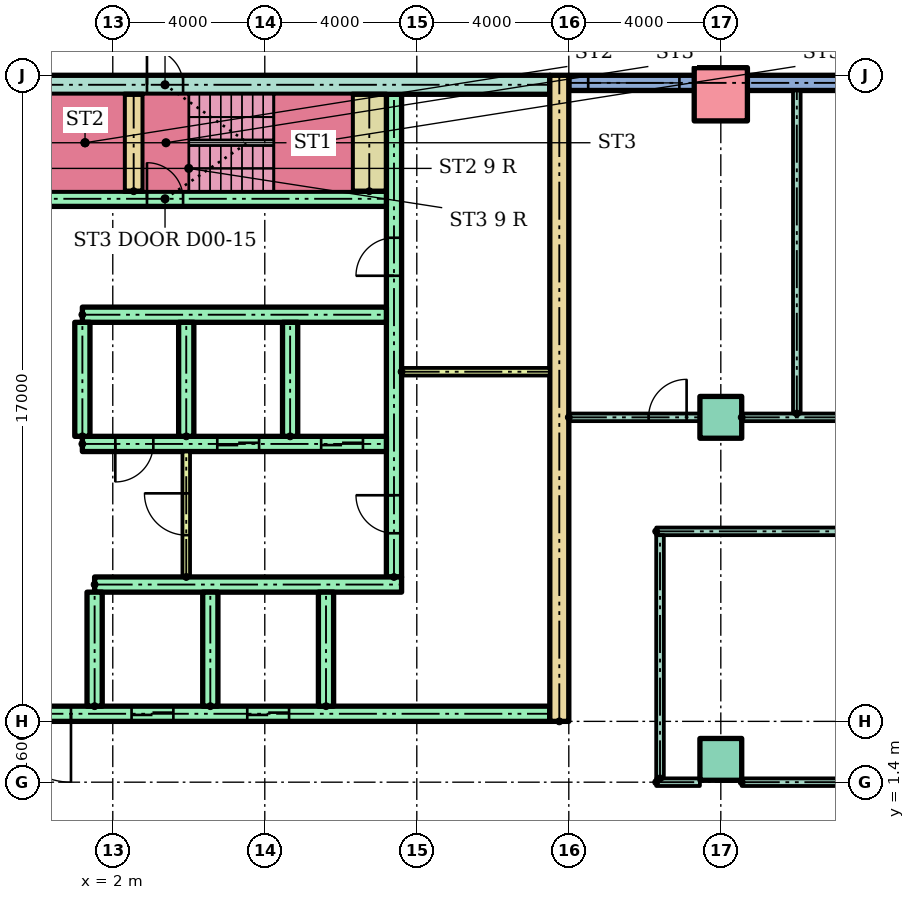
"""IFC4 building model, lengths in metres.
Left out: names, types, materials, properties, quantities, classifications, styles, units other than length and angle.
Written with IfcOpenShell. Run it as: python <this file> out.ifc"""

import sys

from ifc_helpers import new_model, si_unit, direction, frame, frame_2d, origin, origin_2d, place, context, subcontext, project, spatial, rectangle, hollow_rectangle, extrude, element, fill, save


model = new_model("IFC4")
c1 = context("Model", 3, precision=1e-05, world=origin(), true_north=direction((0.0, 1.0)))
c2 = subcontext(c1, "Body", "Model", "MODEL_VIEW")
j1 = project(units=[si_unit("LENGTHUNIT", "METRE"), si_unit("PLANEANGLEUNIT", "RADIAN")], contexts=[c1])
p1 = place(None, origin())
s1 = spatial("IfcSite", under=j1, at=p1, CompositionType="ELEMENT")
p2 = place(p1, origin())
s2 = spatial("IfcBuilding", under=s1, at=p2, CompositionType="ELEMENT")
p3 = place(p2, origin())
s3 = spatial("IfcBuildingStorey", under=s2, at=p3, CompositionType="ELEMENT", Elevation=0.0)
for number, where in (
    (1, (18.0, 2.0, 0.0)),
    (2, (18.0, 11.0, 0.0)),
):
    element("IfcColumn", number, at=place(p3, frame(where)), inside=s3, PredefinedType="COLUMN", context=c2, shape_type="SweptSolid", body=[
        extrude(rectangle(XDim=1.1, YDim=1.1, at=origin_2d()), origin(), (0.0, 0.0, 1.0), 6.0),
    ])
p4 = place(p3, frame((18.0, 19.5, 0.0)))
e3 = element("IfcColumn", 3, at=p4, inside=s3, PredefinedType="COLUMN", context=c2, shape_type="SweptSolid", body=[
    extrude(hollow_rectangle(XDim=1.4, YDim=1.4, WallThickness=0.08, at=origin_2d()), origin(), (0.0, 0.0, 1.0), 6.0),
])
p5 = place(p3, frame((39.6, 19.8, 0.0), z_axis=(0.0, 0.0, 1.0), x_axis=(-1.0, 0.0, 0.0)))
e4 = element("IfcWall", 4, at=p5, inside=s3, PredefinedType="STANDARD", context=c2, shape_type="SweptSolid", body=[
    extrude(rectangle(XDim=25.6, YDim=0.4, at=frame_2d((12.8, 0.0))), origin(), (0.0, 0.0, 1.0), 5.7),
])
p6 = place(p5, frame((2.7, 0.0, 0.0)))
e5 = element("IfcOpeningElement", 5, at=p6, cuts=e4, PredefinedType="OPENING", context=c2, shape_type="SweptSolid", body=[
    extrude(rectangle(XDim=1.8, YDim=2.4, at=frame_2d((0.9, 1.2))), frame((0.0, 0.21, 0.0), z_axis=(0.0, -1.0, 0.0), x_axis=(1.0, 0.0, 0.0)), (0.0, 0.0, 1.0), 0.42),
])
p7 = place(p5, frame((22.69, 0.0, 0.9)))
e6 = element("IfcOpeningElement", 6, at=p7, cuts=e4, PredefinedType="OPENING", context=c2, shape_type="SweptSolid", body=[
    extrude(rectangle(XDim=2.4, YDim=2.4, at=frame_2d((1.2, 1.2))), frame((0.0, 0.21, 0.0), z_axis=(0.0, -1.0, 0.0), x_axis=(1.0, 0.0, 0.0)), (0.0, 0.0, 1.0), 0.42),
])
p8 = place(p5, frame((7.85, 0.0, 0.0)))
e7 = element("IfcOpeningElement", 7, at=p8, cuts=e4, PredefinedType="OPENING", context=c2, shape_type="SweptSolid", body=[
    extrude(rectangle(XDim=3.5, YDim=4.5, at=frame_2d((1.75, 2.25))), frame((0.0, 0.21, 0.0), z_axis=(0.0, -1.0, 0.0), x_axis=(1.0, 0.0, 0.0)), (0.0, 0.0, 1.0), 0.42),
])
p9 = place(p3, frame((13.75, 3.0, 0.0), z_axis=(0.0, 0.0, 1.0), x_axis=(0.0, 1.0, 0.0)))
e8 = element("IfcWall", 8, at=p9, inside=s3, PredefinedType="SHEAR", context=c2, shape_type="SweptSolid", body=[
    extrude(rectangle(XDim=17.0, YDim=0.5, at=frame_2d((8.5, 0.0))), origin(), (0.0, 0.0, 1.0), 5.7),
])
p10 = place(p3, frame((-13.5, 19.75, 0.0)))
e9 = element("IfcWall", 9, at=p10, inside=s3, PredefinedType="SHEAR", context=c2, shape_type="SweptSolid", body=[
    extrude(rectangle(XDim=27.0, YDim=0.5, at=frame_2d((13.5, 0.0))), origin(), (0.0, 0.0, 1.0), 5.7),
])
p11 = place(p10, frame((4.4, 0.0, 0.0)))
e10 = element("IfcOpeningElement", 10, at=p11, cuts=e9, PredefinedType="OPENING", context=c2, shape_type="SweptSolid", body=[
    extrude(rectangle(XDim=0.95, YDim=2.1, at=frame_2d((0.475, 1.05))), frame((0.0, 0.26, 0.0), z_axis=(0.0, -1.0, 0.0), x_axis=(1.0, 0.0, 0.0)), (0.0, 0.0, 1.0), 0.52),
])
p12 = place(p10, frame((10.4, 0.0, 0.0)))
e11 = element("IfcOpeningElement", 11, at=p12, cuts=e9, PredefinedType="OPENING", context=c2, shape_type="SweptSolid", body=[
    extrude(rectangle(XDim=0.95, YDim=2.1, at=frame_2d((0.475, 1.05))), frame((0.0, 0.26, 0.0), z_axis=(0.0, -1.0, 0.0), x_axis=(1.0, 0.0, 0.0)), (0.0, 0.0, 1.0), 0.52),
])
p13 = place(p10, frame((16.4, 0.0, 0.0)))
e12 = element("IfcOpeningElement", 12, at=p13, cuts=e9, PredefinedType="OPENING", context=c2, shape_type="SweptSolid", body=[
    extrude(rectangle(XDim=0.95, YDim=2.1, at=frame_2d((0.475, 1.05))), frame((0.0, 0.26, 0.0), z_axis=(0.0, -1.0, 0.0), x_axis=(1.0, 0.0, 0.0)), (0.0, 0.0, 1.0), 0.52),
])
p14 = place(p3, frame((9.4, 6.8, 0.0), z_axis=(0.0, 0.0, 1.0), x_axis=(0.0, 1.0, 0.0)))
e13 = element("IfcWall", 13, at=p14, inside=s3, PredefinedType="SHEAR", context=c2, shape_type="SweptSolid", body=[
    extrude(rectangle(XDim=12.7, YDim=0.4, at=frame_2d((6.35, 0.0))), origin(), (0.0, 0.0, 1.0), 5.7),
])
p15 = place(p14, frame((1.15, 0.0, 0.0)))
e14 = element("IfcOpeningElement", 14, at=p15, cuts=e13, PredefinedType="OPENING", context=c2, shape_type="SweptSolid", body=[
    extrude(rectangle(XDim=1.0, YDim=2.1, at=frame_2d((0.5, 1.05))), frame((0.0, 0.21, 0.0), z_axis=(0.0, -1.0, 0.0), x_axis=(1.0, 0.0, 0.0)), (0.0, 0.0, 1.0), 0.42),
])
p16 = place(p14, frame((7.925, 0.0, 0.0)))
e15 = element("IfcOpeningElement", 15, at=p16, cuts=e13, PredefinedType="OPENING", context=c2, shape_type="SweptSolid", body=[
    extrude(rectangle(XDim=1.0, YDim=2.1, at=frame_2d((0.5, 1.05))), frame((0.0, 0.21, 0.0), z_axis=(0.0, -1.0, 0.0), x_axis=(1.0, 0.0, 0.0)), (0.0, 0.0, 1.0), 0.42),
])
p17 = place(p3, frame((-13.5, 3.2, 0.0)))
e16 = element("IfcWall", 16, at=p17, inside=s3, PredefinedType="SHEAR", context=c2, shape_type="SweptSolid", body=[
    extrude(rectangle(XDim=27.0, YDim=0.4, at=frame_2d((13.5, 0.0))), origin(), (0.0, 0.0, 1.0), 5.7),
])
p18 = place(p17, frame((0.772, 0.0, 0.0)))
e17 = element("IfcOpeningElement", 17, at=p18, cuts=e16, PredefinedType="OPENING", context=c2, shape_type="SweptSolid", body=[
    extrude(rectangle(XDim=1.1, YDim=2.1, at=frame_2d((0.55, 1.05))), frame((0.0, 0.21, 0.0), z_axis=(0.0, -1.0, 0.0), x_axis=(1.0, 0.0, 0.0)), (0.0, 0.0, 1.0), 0.42),
])
p19 = place(p17, frame((3.817, 0.0, 0.0)))
e18 = element("IfcOpeningElement", 18, at=p19, cuts=e16, PredefinedType="OPENING", context=c2, shape_type="SweptSolid", body=[
    extrude(rectangle(XDim=1.1, YDim=2.1, at=frame_2d((0.55, 1.05))), frame((0.0, 0.21, 0.0), z_axis=(0.0, -1.0, 0.0), x_axis=(1.0, 0.0, 0.0)), (0.0, 0.0, 1.0), 0.42),
])
p20 = place(p17, frame((6.861, 0.0, 0.0)))
e19 = element("IfcOpeningElement", 19, at=p20, cuts=e16, PredefinedType="OPENING", context=c2, shape_type="SweptSolid", body=[
    extrude(rectangle(XDim=1.1, YDim=2.1, at=frame_2d((0.55, 1.05))), frame((0.0, 0.21, 0.0), z_axis=(0.0, -1.0, 0.0), x_axis=(1.0, 0.0, 0.0)), (0.0, 0.0, 1.0), 0.42),
])
p21 = place(p17, frame((9.906, 0.0, 0.0)))
e20 = element("IfcOpeningElement", 20, at=p21, cuts=e16, PredefinedType="OPENING", context=c2, shape_type="SweptSolid", body=[
    extrude(rectangle(XDim=1.1, YDim=2.1, at=frame_2d((0.55, 1.05))), frame((0.0, 0.21, 0.0), z_axis=(0.0, -1.0, 0.0), x_axis=(1.0, 0.0, 0.0)), (0.0, 0.0, 1.0), 0.42),
])
p22 = place(p17, frame((15.994, 0.0, 0.0)))
e21 = element("IfcOpeningElement", 21, at=p22, cuts=e16, PredefinedType="OPENING", context=c2, shape_type="SweptSolid", body=[
    extrude(rectangle(XDim=1.1, YDim=2.1, at=frame_2d((0.55, 1.05))), frame((0.0, 0.21, 0.0), z_axis=(0.0, -1.0, 0.0), x_axis=(1.0, 0.0, 0.0)), (0.0, 0.0, 1.0), 0.42),
])
p23 = place(p17, frame((19.039, 0.0, 0.0)))
e22 = element("IfcOpeningElement", 22, at=p23, cuts=e16, PredefinedType="OPENING", context=c2, shape_type="SweptSolid", body=[
    extrude(rectangle(XDim=1.1, YDim=2.1, at=frame_2d((0.55, 1.05))), frame((0.0, 0.21, 0.0), z_axis=(0.0, -1.0, 0.0), x_axis=(1.0, 0.0, 0.0)), (0.0, 0.0, 1.0), 0.42),
])
p24 = place(p17, frame((12.6, 0.0, 0.0)))
e23 = element("IfcOpeningElement", 23, at=p24, cuts=e16, PredefinedType="OPENING", context=c2, shape_type="SweptSolid", body=[
    extrude(rectangle(XDim=1.8, YDim=2.1, at=frame_2d((0.9, 1.05))), frame((0.0, 0.21, 0.0), z_axis=(0.0, -1.0, 0.0), x_axis=(1.0, 0.0, 0.0)), (0.0, 0.0, 1.0), 0.42),
])
p25 = place(p3, frame((1.522, 6.6, 0.0)))
e24 = element("IfcWall", 24, at=p25, inside=s3, PredefinedType="SHEAR", context=c2, shape_type="SweptSolid", body=[
    extrude(rectangle(XDim=8.078, YDim=0.4, at=frame_2d((4.039, 0.0))), origin(), (0.0, 0.0, 1.0), 5.7),
])
for number, where, z_axis, x_axis in (
    (25, (1.522, 3.4, 0.0), (0.0, 0.0, 1.0), (0.0, 1.0, 0.0)),
    (26, (4.567, 3.4, 0.0), (0.0, 0.0, 1.0), (0.0, 1.0, 0.0)),
    (27, (7.611, 3.4, 0.0), (0.0, 0.0, 1.0), (0.0, 1.0, 0.0)),
):
    element("IfcWall", number, at=place(p3, frame(where, z_axis=z_axis, x_axis=x_axis)), inside=s3, PredefinedType="SHEAR", context=c2, shape_type="SweptSolid", body=[
        extrude(rectangle(XDim=3.0, YDim=0.4, at=frame_2d((1.5, 0.0))), origin(), (0.0, 0.0, 1.0), 5.7),
    ])
p26 = place(p3, frame((1.2, 10.3, 0.0)))
e28 = element("IfcWall", 28, at=p26, inside=s3, PredefinedType="SHEAR", context=c2, shape_type="SweptSolid", body=[
    extrude(rectangle(XDim=8.0, YDim=0.4, at=frame_2d((4.0, 0.0))), origin(), (0.0, 0.0, 1.0), 5.7),
])
p27 = place(p26, frame((3.55, 0.0, 0.0)))
e29 = element("IfcOpeningElement", 29, at=p27, cuts=e28, PredefinedType="OPENING", context=c2, shape_type="SweptSolid", body=[
    extrude(rectangle(XDim=1.1, YDim=2.1, at=frame_2d((0.55, 1.05))), frame((0.0, 0.21, 0.0), z_axis=(0.0, -1.0, 0.0), x_axis=(1.0, 0.0, 0.0)), (0.0, 0.0, 1.0), 0.42),
])
p28 = place(p26, frame((6.283, 0.0, 0.0)))
e30 = element("IfcOpeningElement", 30, at=p28, cuts=e28, PredefinedType="OPENING", context=c2, shape_type="SweptSolid", body=[
    extrude(rectangle(XDim=1.1, YDim=2.1, at=frame_2d((0.55, 1.05))), frame((0.0, 0.21, 0.0), z_axis=(0.0, -1.0, 0.0), x_axis=(1.0, 0.0, 0.0)), (0.0, 0.0, 1.0), 0.42),
])
p29 = place(p26, frame((0.867, 0.0, 0.0)))
e31 = element("IfcOpeningElement", 31, at=p29, cuts=e28, PredefinedType="OPENING", context=c2, shape_type="SweptSolid", body=[
    extrude(rectangle(XDim=1.0, YDim=2.1, at=frame_2d((0.5, 1.05))), frame((0.0, 0.21, 0.0), z_axis=(0.0, -1.0, 0.0), x_axis=(1.0, 0.0, 0.0)), (0.0, 0.0, 1.0), 0.42),
])
p30 = place(p3, frame((1.2, 13.7, 0.0)))
e32 = element("IfcWall", 32, at=p30, inside=s3, PredefinedType="SHEAR", context=c2, shape_type="SweptSolid", body=[
    extrude(rectangle(XDim=8.0, YDim=0.4, at=frame_2d((4.0, 0.0))), origin(), (0.0, 0.0, 1.0), 5.7),
])
for number, where, z_axis, x_axis in (
    (33, (1.2, 10.5, 0.0), (0.0, 0.0, 1.0), (0.0, 1.0, 0.0)),
    (34, (3.933, 10.5, 0.0), (0.0, 0.0, 1.0), (0.0, 1.0, 0.0)),
    (35, (6.667, 10.5, 0.0), (0.0, 0.0, 1.0), (0.0, 1.0, 0.0)),
):
    element("IfcWall", number, at=place(p3, frame(where, z_axis=z_axis, x_axis=x_axis)), inside=s3, PredefinedType="SHEAR", context=c2, shape_type="SweptSolid", body=[
        extrude(rectangle(XDim=3.0, YDim=0.4, at=frame_2d((1.5, 0.0))), origin(), (0.0, 0.0, 1.0), 5.7),
    ])
p31 = place(p3, frame((3.933, 6.8, 0.0), z_axis=(0.0, 0.0, 1.0), x_axis=(0.0, 1.0, 0.0)))
e36 = element("IfcWall", 36, at=p31, inside=s3, PredefinedType="PARTITIONING", context=c2, shape_type="SweptSolid", body=[
    extrude(rectangle(XDim=3.3, YDim=0.2, at=frame_2d((1.65, 0.0))), origin(), (0.0, 0.0, 1.0), 5.7),
])
p32 = place(p31, frame((1.1, 0.0, 0.0)))
e37 = element("IfcOpeningElement", 37, at=p32, cuts=e36, PredefinedType="OPENING", context=c2, shape_type="SweptSolid", body=[
    extrude(rectangle(XDim=1.1, YDim=2.1, at=frame_2d((0.55, 1.05))), frame((0.0, 0.11, 0.0), z_axis=(0.0, -1.0, 0.0), x_axis=(1.0, 0.0, 0.0)), (0.0, 0.0, 1.0), 0.22),
])
p33 = place(p3, frame((-9.2, 16.75, 0.0)))
e38 = element("IfcWall", 38, at=p33, inside=s3, PredefinedType="SHEAR", context=c2, shape_type="SweptSolid", body=[
    extrude(rectangle(XDim=18.4, YDim=0.4, at=frame_2d((9.2, 0.0))), origin(), (0.0, 0.0, 1.0), 5.7),
])
p34 = place(p33, frame((0.1, 0.0, 0.0)))
e39 = element("IfcOpeningElement", 39, at=p34, cuts=e38, PredefinedType="OPENING", context=c2, shape_type="SweptSolid", body=[
    extrude(rectangle(XDim=0.95, YDim=2.1, at=frame_2d((0.475, 1.05))), frame((0.0, 0.21, 0.0), z_axis=(0.0, -1.0, 0.0), x_axis=(1.0, 0.0, 0.0)), (0.0, 0.0, 1.0), 0.42),
])
p35 = place(p33, frame((6.1, 0.0, 0.0)))
e40 = element("IfcOpeningElement", 40, at=p35, cuts=e38, PredefinedType="OPENING", context=c2, shape_type="SweptSolid", body=[
    extrude(rectangle(XDim=0.95, YDim=2.1, at=frame_2d((0.475, 1.05))), frame((0.0, 0.21, 0.0), z_axis=(0.0, -1.0, 0.0), x_axis=(1.0, 0.0, 0.0)), (0.0, 0.0, 1.0), 0.42),
])
p36 = place(p33, frame((12.1, 0.0, 0.0)))
e41 = element("IfcOpeningElement", 41, at=p36, cuts=e38, PredefinedType="OPENING", context=c2, shape_type="SweptSolid", body=[
    extrude(rectangle(XDim=0.95, YDim=2.1, at=frame_2d((0.475, 1.05))), frame((0.0, 0.21, 0.0), z_axis=(0.0, -1.0, 0.0), x_axis=(1.0, 0.0, 0.0)), (0.0, 0.0, 1.0), 0.42),
])
p37 = place(p3, frame((2.55, 16.95, 0.0), z_axis=(0.0, 0.0, 1.0), x_axis=(0.0, 1.0, 0.0)))
e42 = element("IfcWall", 42, at=p37, inside=s3, PredefinedType="SHEAR", context=c2, shape_type="SweptSolid", body=[
    extrude(rectangle(XDim=2.55, YDim=0.5, at=frame_2d((1.275, 0.0))), origin(), (0.0, 0.0, 1.0), 5.7),
])
p38 = place(p3, frame((8.75, 16.95, 0.0), z_axis=(0.0, 0.0, 1.0), x_axis=(0.0, 1.0, 0.0)))
e43 = element("IfcWall", 43, at=p38, inside=s3, PredefinedType="SHEAR", context=c2, shape_type="SweptSolid", body=[
    extrude(rectangle(XDim=2.55, YDim=0.9, at=frame_2d((1.275, 0.0))), origin(), (0.0, 0.0, 1.0), 5.7),
])
p39 = place(p3, frame((9.6, 12.2, 0.0)))
e44 = element("IfcWall", 44, at=p39, inside=s3, PredefinedType="PARTITIONING", context=c2, shape_type="SweptSolid", body=[
    extrude(rectangle(XDim=3.9, YDim=0.2, at=frame_2d((1.95, 0.0))), origin(), (0.0, 0.0, 1.0), 5.7),
])
p40 = place(p3, frame((16.3, 1.4, 0.0)))
e45 = element("IfcWall", 45, at=p40, inside=s3, PredefinedType="PARTITIONING", context=c2, shape_type="SweptSolid", body=[
    extrude(rectangle(XDim=1.15, YDim=0.2, at=frame_2d((0.575, 0.0))), origin(), (0.0, 0.0, 1.0), 5.7),
])
p41 = place(p3, frame((18.55, 1.4, 0.0)))
e46 = element("IfcWall", 46, at=p41, inside=s3, PredefinedType="PARTITIONING", context=c2, shape_type="SweptSolid", body=[
    extrude(rectangle(XDim=6.9, YDim=0.2, at=frame_2d((3.45, 0.0))), origin(), (0.0, 0.0, 1.0), 5.7),
])
p42 = place(p3, frame((16.3, 8.0, 0.0)))
e47 = element("IfcWall", 47, at=p42, inside=s3, PredefinedType="PARTITIONING", context=c2, shape_type="SweptSolid", body=[
    extrude(rectangle(XDim=21.2, YDim=0.2, at=frame_2d((10.6, 0.0))), origin(), (0.0, 0.0, 1.0), 5.7),
])
p43 = place(p3, frame((14.0, 11.0, 0.0)))
e48 = element("IfcWall", 48, at=p43, inside=s3, PredefinedType="PARTITIONING", context=c2, shape_type="SweptSolid", body=[
    extrude(rectangle(XDim=3.45, YDim=0.2, at=frame_2d((1.725, 0.0))), origin(), (0.0, 0.0, 1.0), 5.7),
])
p44 = place(p43, frame((2.1, 0.0, 0.0)))
e49 = element("IfcOpeningElement", 49, at=p44, cuts=e48, PredefinedType="OPENING", context=c2, shape_type="SweptSolid", body=[
    extrude(rectangle(XDim=1.0, YDim=2.1, at=frame_2d((0.5, 1.05))), frame((0.0, 0.11, 0.0), z_axis=(0.0, -1.0, 0.0), x_axis=(1.0, 0.0, 0.0)), (0.0, 0.0, 1.0), 0.22),
])
p45 = place(p3, frame((18.55, 11.0, 0.0)))
e50 = element("IfcWall", 50, at=p45, inside=s3, PredefinedType="PARTITIONING", context=c2, shape_type="SweptSolid", body=[
    extrude(rectangle(XDim=6.9, YDim=0.2, at=frame_2d((3.45, 0.0))), origin(), (0.0, 0.0, 1.0), 5.7),
])
p46 = place(p45, frame((4.75, 0.0, 0.0)))
e51 = element("IfcOpeningElement", 51, at=p46, cuts=e50, PredefinedType="OPENING", context=c2, shape_type="SweptSolid", body=[
    extrude(rectangle(XDim=1.0, YDim=2.1, at=frame_2d((0.5, 1.05))), frame((0.0, 0.11, 0.0), z_axis=(0.0, -1.0, 0.0), x_axis=(1.0, 0.0, 0.0)), (0.0, 0.0, 1.0), 0.22),
])
p47 = place(p3, frame((16.4, 1.5, 0.0), z_axis=(0.0, 0.0, 1.0), x_axis=(0.0, 1.0, 0.0)))
e52 = element("IfcWall", 52, at=p47, inside=s3, PredefinedType="PARTITIONING", context=c2, shape_type="SweptSolid", body=[
    extrude(rectangle(XDim=6.4, YDim=0.2, at=frame_2d((3.2, 0.0))), origin(), (0.0, 0.0, 1.0), 5.7),
])
p48 = place(p3, frame((20.0, 11.1, 0.0), z_axis=(0.0, 0.0, 1.0), x_axis=(0.0, 1.0, 0.0)))
e53 = element("IfcWall", 53, at=p48, inside=s3, PredefinedType="PARTITIONING", context=c2, shape_type="SweptSolid", body=[
    extrude(rectangle(XDim=8.5, YDim=0.2, at=frame_2d((4.25, 0.0))), origin(), (0.0, 0.0, 1.0), 5.7),
])
p49 = place(p7, origin())
e54 = element("IfcWindow", 54, at=p49, inside=s3, PartitioningType="SINGLE_PANEL", PredefinedType="WINDOW", context=c2, shape_type="SweptSolid", body=[
    extrude(rectangle(XDim=2.4, YDim=2.4, at=frame_2d((1.2, 1.2))), frame((0.0, 0.03, 0.0), z_axis=(0.0, -1.0, 0.0), x_axis=(1.0, 0.0, 0.0)), (0.0, 0.0, 1.0), 0.06),
])
fill(e6, e54)
p50 = place(p22, origin())
e55 = element("IfcDoor", 55, at=p50, inside=s3, OperationType="SLIDING_TO_LEFT", PredefinedType="DOOR", context=c2, shape_type="SweptSolid", body=[
    extrude(rectangle(XDim=1.1, YDim=2.1, at=frame_2d((0.55, 1.05))), frame((0.0, 0.025, 0.0), z_axis=(0.0, -1.0, 0.0), x_axis=(1.0, 0.0, 0.0)), (0.0, 0.0, 1.0), 0.05),
])
fill(e21, e55)
p51 = place(p23, origin())
e56 = element("IfcDoor", 56, at=p51, inside=s3, OperationType="SLIDING_TO_LEFT", PredefinedType="DOOR", context=c2, shape_type="SweptSolid", body=[
    extrude(rectangle(XDim=1.1, YDim=2.1, at=frame_2d((0.55, 1.05))), frame((0.0, 0.025, 0.0), z_axis=(0.0, -1.0, 0.0), x_axis=(1.0, 0.0, 0.0)), (0.0, 0.0, 1.0), 0.05),
])
fill(e22, e56)
p52 = place(p24, frame((1.8, 0.0, 0.0), z_axis=(0.0, 0.0, 1.0), x_axis=(-1.0, 0.0, 0.0)))
e57 = element("IfcDoor", 57, at=p52, inside=s3, OperationType="DOUBLE_DOOR_SINGLE_SWING", PredefinedType="DOOR", context=c2, shape_type="SweptSolid", body=[
    extrude(rectangle(XDim=1.8, YDim=2.1, at=frame_2d((0.9, 1.05))), frame((0.0, 0.025, 0.0), z_axis=(0.0, -1.0, 0.0), x_axis=(1.0, 0.0, 0.0)), (0.0, 0.0, 1.0), 0.05),
])
fill(e23, e57)
p53 = place(p27, origin())
e58 = element("IfcDoor", 58, at=p53, inside=s3, OperationType="SLIDING_TO_LEFT", PredefinedType="DOOR", context=c2, shape_type="SweptSolid", body=[
    extrude(rectangle(XDim=1.1, YDim=2.1, at=frame_2d((0.55, 1.05))), frame((0.0, 0.025, 0.0), z_axis=(0.0, -1.0, 0.0), x_axis=(1.0, 0.0, 0.0)), (0.0, 0.0, 1.0), 0.05),
])
fill(e29, e58)
p54 = place(p28, origin())
e59 = element("IfcDoor", 59, at=p54, inside=s3, OperationType="SLIDING_TO_LEFT", PredefinedType="DOOR", context=c2, shape_type="SweptSolid", body=[
    extrude(rectangle(XDim=1.1, YDim=2.1, at=frame_2d((0.55, 1.05))), frame((0.0, 0.025, 0.0), z_axis=(0.0, -1.0, 0.0), x_axis=(1.0, 0.0, 0.0)), (0.0, 0.0, 1.0), 0.05),
])
fill(e30, e59)
p55 = place(p29, frame((1.0, 0.0, 0.0), z_axis=(0.0, 0.0, 1.0), x_axis=(-1.0, 0.0, 0.0)))
e60 = element("IfcDoor", 60, at=p55, inside=s3, OperationType="SINGLE_SWING_LEFT", PredefinedType="DOOR", context=c2, shape_type="SweptSolid", body=[
    extrude(rectangle(XDim=1.0, YDim=2.1, at=frame_2d((0.5, 1.05))), frame((0.0, 0.025, 0.0), z_axis=(0.0, -1.0, 0.0), x_axis=(1.0, 0.0, 0.0)), (0.0, 0.0, 1.0), 0.05),
])
fill(e31, e60)
p56 = place(p32, origin())
e61 = element("IfcDoor", 61, at=p56, inside=s3, OperationType="SINGLE_SWING_RIGHT", PredefinedType="DOOR", context=c2, shape_type="SweptSolid", body=[
    extrude(rectangle(XDim=1.1, YDim=2.1, at=frame_2d((0.55, 1.05))), frame((0.0, 0.025, 0.0), z_axis=(0.0, -1.0, 0.0), x_axis=(1.0, 0.0, 0.0)), (0.0, 0.0, 1.0), 0.05),
])
fill(e37, e61)
p57 = place(p36, origin())
e62 = element("IfcDoor", 62, at=p57, inside=s3, OperationType="SINGLE_SWING_LEFT", PredefinedType="DOOR", context=c2, shape_type="SweptSolid", body=[
    extrude(rectangle(XDim=0.95, YDim=2.1, at=frame_2d((0.475, 1.05))), frame((0.0, 0.025, 0.0), z_axis=(0.0, -1.0, 0.0), x_axis=(1.0, 0.0, 0.0)), (0.0, 0.0, 1.0), 0.05),
])
fill(e41, e62)
p58 = place(p13, origin())
e63 = element("IfcDoor", 63, at=p58, inside=s3, OperationType="SINGLE_SWING_LEFT", PredefinedType="DOOR", context=c2, shape_type="SweptSolid", body=[
    extrude(rectangle(XDim=0.95, YDim=2.1, at=frame_2d((0.475, 1.05))), frame((0.0, 0.025, 0.0), z_axis=(0.0, -1.0, 0.0), x_axis=(1.0, 0.0, 0.0)), (0.0, 0.0, 1.0), 0.05),
])
fill(e12, e63)
p59 = place(p15, origin())
e64 = element("IfcDoor", 64, at=p59, inside=s3, OperationType="SINGLE_SWING_RIGHT", PredefinedType="DOOR", context=c2, shape_type="SweptSolid", body=[
    extrude(rectangle(XDim=1.0, YDim=2.1, at=frame_2d((0.5, 1.05))), frame((0.0, 0.025, 0.0), z_axis=(0.0, -1.0, 0.0), x_axis=(1.0, 0.0, 0.0)), (0.0, 0.0, 1.0), 0.05),
])
fill(e14, e64)
p60 = place(p16, origin())
e65 = element("IfcDoor", 65, at=p60, inside=s3, OperationType="SINGLE_SWING_LEFT", PredefinedType="DOOR", context=c2, shape_type="SweptSolid", body=[
    extrude(rectangle(XDim=1.0, YDim=2.1, at=frame_2d((0.5, 1.05))), frame((0.0, 0.025, 0.0), z_axis=(0.0, -1.0, 0.0), x_axis=(1.0, 0.0, 0.0)), (0.0, 0.0, 1.0), 0.05),
])
fill(e15, e65)
p61 = place(p44, origin())
e66 = element("IfcDoor", 66, at=p61, inside=s3, OperationType="SINGLE_SWING_RIGHT", PredefinedType="DOOR", context=c2, shape_type="SweptSolid", body=[
    extrude(rectangle(XDim=1.0, YDim=2.1, at=frame_2d((0.5, 1.05))), frame((0.0, 0.025, 0.0), z_axis=(0.0, -1.0, 0.0), x_axis=(1.0, 0.0, 0.0)), (0.0, 0.0, 1.0), 0.05),
])
fill(e49, e66)
save(model, sys.argv[1])
